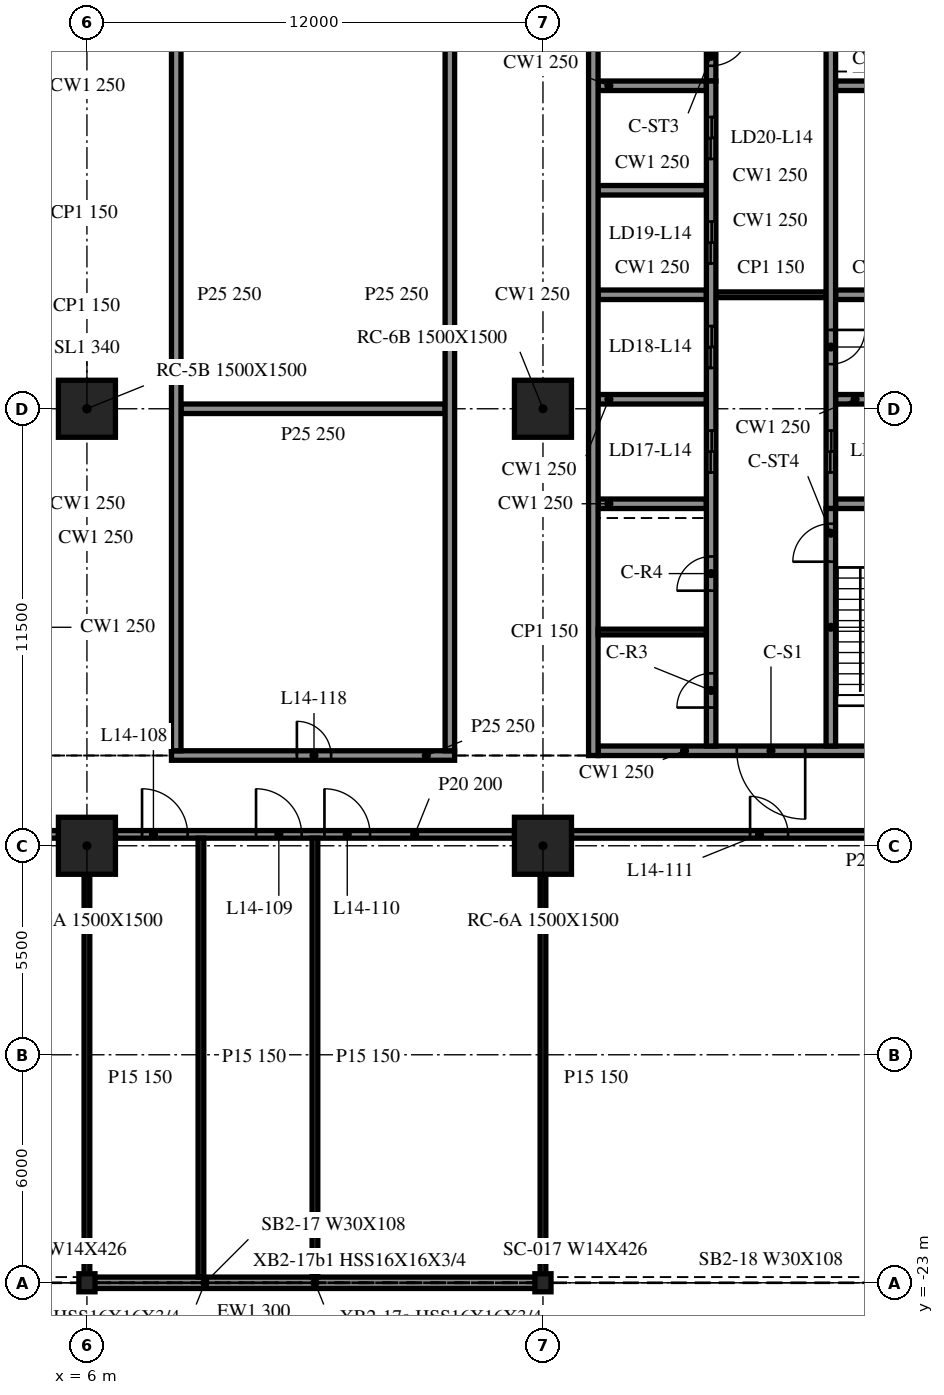
"""IFC4 building model, lengths in metres.
Left out: names, types, materials, properties, quantities, classifications, styles, units other than length and angle.
Written with IfcOpenShell. Run it as: python <this file> out.ifc"""

import sys

from ifc_helpers import new_model, si_unit, direction, frame, frame_2d, origin, origin_2d, place, context, subcontext, project, spatial, rectangle, i_section, extrude, element, fill, save


model = new_model("IFC4")
c1 = context("Model", 3, precision=1e-05, world=origin(), true_north=direction((0.0, 1.0)))
c2 = subcontext(c1, "Body", "Model", "MODEL_VIEW")
j1 = project(units=[si_unit("LENGTHUNIT", "METRE"), si_unit("PLANEANGLEUNIT", "RADIAN")], contexts=[c1])
p1 = place(None, origin())
s1 = spatial("IfcSite", under=j1, at=p1, CompositionType="ELEMENT")
p2 = place(p1, origin())
s2 = spatial("IfcBuilding", under=s1, at=p2, CompositionType="ELEMENT")
p3 = place(p2, frame((0.0, 0.0, 63.2)))
s3 = spatial("IfcBuildingStorey", under=s2, at=p3, CompositionType="ELEMENT", Elevation=63.2)
for number, where, z_axis, x_axis in (
    (1, (6.0, -11.5, -0.34), (0.0, 0.0, 1.0), (1.0, 0.0, 0.0)),
    (2, (6.0, 0.0, -0.34), (0.0, 0.0, 1.0), (1.0, 0.0, 0.0)),
    (3, (18.0, -11.5, -0.34), (0.0, 0.0, 1.0), (1.0, 0.0, 0.0)),
    (4, (18.0, 0.0, -0.34), (0.0, 0.0, 1.0), (1.0, 0.0, 0.0)),
):
    element("IfcColumn", number, at=place(p3, frame(where, z_axis=z_axis, x_axis=x_axis)), inside=s3, PredefinedType="COLUMN", context=c2, shape_type="SweptSolid", body=[
        extrude(rectangle(XDim=1.5, YDim=1.5, at=origin_2d()), origin(), (0.0, 0.0, 1.0), 4.3),
    ])
for number, where, z_axis, x_axis in (
    (5, (6.0, -23.0, -0.34), (0.0, 0.0, 1.0), (1.0, 0.0, 0.0)),
    (6, (18.0, -23.0, -0.34), (0.0, 0.0, 1.0), (1.0, 0.0, 0.0)),
):
    element("IfcColumn", number, at=place(p3, frame(where, z_axis=z_axis, x_axis=x_axis)), inside=s3, PredefinedType="COLUMN", context=c2, shape_type="SweptSolid", body=[
        extrude(i_section(OverallWidth=0.424, OverallDepth=0.475, WebThickness=0.048, FlangeThickness=0.077, at=origin_2d()), origin(), (0.0, 0.0, 1.0), 4.3),
    ])
p4 = place(p3, frame((6.024, -23.0, 0.0), z_axis=(0.0, 0.0, 1.0), x_axis=(1.0, 0.0, 0.0)))
e7 = element("IfcWall", 7, at=p4, inside=s3, PredefinedType="NOTDEFINED", context=c2, shape_type="SweptSolid", body=[
    extrude(rectangle(XDim=11.952, YDim=0.3, at=frame_2d((5.976, 0.0))), origin(), (0.0, 0.0, 1.0), 3.203),
])
p5 = place(p3, frame((19.325, 15.125, 0.0), z_axis=(0.0, 0.0, 1.0), x_axis=(0.0, -1.0, 0.0)))
e8 = element("IfcWall", 8, at=p5, inside=s3, PredefinedType="SOLIDWALL", context=c2, shape_type="SweptSolid", body=[
    extrude(rectangle(XDim=24.25, YDim=0.25, at=frame_2d((12.125, 0.0))), origin(), (0.0, 0.0, 1.0), 3.96),
])
p6 = place(p3, frame((28.55, -9.0, 0.0), z_axis=(0.0, 0.0, 1.0), x_axis=(-1.0, 0.0, 0.0)))
e9 = element("IfcWall", 9, at=p6, inside=s3, PredefinedType="SOLIDWALL", context=c2, shape_type="SweptSolid", body=[
    extrude(rectangle(XDim=9.1, YDim=0.25, at=frame_2d((4.55, 0.0))), origin(), (0.0, 0.0, 1.0), 3.96),
])
p7 = place(p6, frame((3.65, 0.0, 0.0)))
e10 = element("IfcOpeningElement", 10, at=p7, cuts=e9, PredefinedType="OPENING", context=c2, shape_type="SweptSolid", body=[
    extrude(rectangle(XDim=1.8, YDim=2.1, at=frame_2d((0.9, 1.05))), frame((0.0, 0.135, 0.0), z_axis=(0.0, -1.0, 0.0), x_axis=(1.0, 0.0, 0.0)), (0.0, 0.0, 1.0), 0.27),
])
p8 = place(p3, frame((22.425, -8.875, 0.0), z_axis=(0.0, 0.0, 1.0), x_axis=(0.0, 1.0, 0.0)))
e11 = element("IfcWall", 11, at=p8, inside=s3, PredefinedType="SOLIDWALL", context=c2, shape_type="SweptSolid", body=[
    extrude(rectangle(XDim=17.5, YDim=0.25, at=frame_2d((8.75, 0.0))), origin(), (0.0, 0.0, 1.0), 3.96),
])
p9 = place(p8, frame((7.2, 0.0, 0.0)))
e12 = element("IfcOpeningElement", 12, at=p9, cuts=e11, PredefinedType="OPENING", context=c2, shape_type="SweptSolid", body=[
    extrude(rectangle(XDim=1.1, YDim=2.1, at=frame_2d((0.55, 1.05))), frame((0.0, 0.135, 0.0), z_axis=(0.0, -1.0, 0.0), x_axis=(1.0, 0.0, 0.0)), (0.0, 0.0, 1.0), 0.27),
])
p10 = place(p8, frame((9.95, 0.0, 0.0)))
e13 = element("IfcOpeningElement", 13, at=p10, cuts=e11, PredefinedType="OPENING", context=c2, shape_type="SweptSolid", body=[
    extrude(rectangle(XDim=1.1, YDim=2.1, at=frame_2d((0.55, 1.05))), frame((0.0, 0.135, 0.0), z_axis=(0.0, -1.0, 0.0), x_axis=(1.0, 0.0, 0.0)), (0.0, 0.0, 1.0), 0.27),
])
p11 = place(p8, frame((12.7, 0.0, 0.0)))
e14 = element("IfcOpeningElement", 14, at=p11, cuts=e11, PredefinedType="OPENING", context=c2, shape_type="SweptSolid", body=[
    extrude(rectangle(XDim=1.1, YDim=2.1, at=frame_2d((0.55, 1.05))), frame((0.0, 0.135, 0.0), z_axis=(0.0, -1.0, 0.0), x_axis=(1.0, 0.0, 0.0)), (0.0, 0.0, 1.0), 0.27),
])
p12 = place(p8, frame((15.45, 0.0, 0.0)))
e15 = element("IfcOpeningElement", 15, at=p12, cuts=e11, PredefinedType="OPENING", context=c2, shape_type="SweptSolid", body=[
    extrude(rectangle(XDim=1.1, YDim=2.1, at=frame_2d((0.55, 1.05))), frame((0.0, 0.135, 0.0), z_axis=(0.0, -1.0, 0.0), x_axis=(1.0, 0.0, 0.0)), (0.0, 0.0, 1.0), 0.27),
])
p13 = place(p8, frame((1.012, 0.0, 0.0)))
e16 = element("IfcOpeningElement", 16, at=p13, cuts=e11, PredefinedType="OPENING", context=c2, shape_type="SweptSolid", body=[
    extrude(rectangle(XDim=0.9, YDim=2.1, at=frame_2d((0.45, 1.05))), frame((0.0, 0.135, 0.0), z_axis=(0.0, -1.0, 0.0), x_axis=(1.0, 0.0, 0.0)), (0.0, 0.0, 1.0), 0.27),
])
p14 = place(p8, frame((4.087, 0.0, 0.0)))
e17 = element("IfcOpeningElement", 17, at=p14, cuts=e11, PredefinedType="OPENING", context=c2, shape_type="SweptSolid", body=[
    extrude(rectangle(XDim=0.9, YDim=2.1, at=frame_2d((0.45, 1.05))), frame((0.0, 0.135, 0.0), z_axis=(0.0, -1.0, 0.0), x_axis=(1.0, 0.0, 0.0)), (0.0, 0.0, 1.0), 0.27),
])
p15 = place(p3, frame((22.425, 14.875, 0.0), z_axis=(0.0, 0.0, 1.0), x_axis=(0.0, -1.0, 0.0)))
e18 = element("IfcWall", 18, at=p15, inside=s3, PredefinedType="SOLIDWALL", context=c2, shape_type="SweptSolid", body=[
    extrude(rectangle(XDim=6.25, YDim=0.25, at=frame_2d((3.125, 0.0))), origin(), (0.0, 0.0, 1.0), 3.96),
])
p16 = place(p15, frame((4.85, 0.0, 0.0)))
e19 = element("IfcOpeningElement", 19, at=p16, cuts=e18, PredefinedType="OPENING", context=c2, shape_type="SweptSolid", body=[
    extrude(rectangle(XDim=1.0, YDim=2.1, at=frame_2d((0.5, 1.05))), frame((0.0, 0.135, 0.0), z_axis=(0.0, -1.0, 0.0), x_axis=(1.0, 0.0, 0.0)), (0.0, 0.0, 1.0), 0.27),
])
p17 = place(p3, frame((25.575, -8.875, 0.0), z_axis=(0.0, 0.0, 1.0), x_axis=(0.0, 1.0, 0.0)))
e20 = element("IfcWall", 20, at=p17, inside=s3, PredefinedType="SOLIDWALL", context=c2, shape_type="SweptSolid", body=[
    extrude(rectangle(XDim=6.25, YDim=0.25, at=frame_2d((3.125, 0.0))), origin(), (0.0, 0.0, 1.0), 3.96),
])
p18 = place(p17, frame((4.85, 0.0, 0.0)))
e21 = element("IfcOpeningElement", 21, at=p18, cuts=e20, PredefinedType="OPENING", context=c2, shape_type="SweptSolid", body=[
    extrude(rectangle(XDim=1.0, YDim=2.1, at=frame_2d((0.5, 1.05))), frame((0.0, 0.135, 0.0), z_axis=(0.0, -1.0, 0.0), x_axis=(1.0, 0.0, 0.0)), (0.0, 0.0, 1.0), 0.27),
])
p19 = place(p3, frame((25.575, 14.875, 0.0), z_axis=(0.0, 0.0, 1.0), x_axis=(0.0, -1.0, 0.0)))
e22 = element("IfcWall", 22, at=p19, inside=s3, PredefinedType="SOLIDWALL", context=c2, shape_type="SweptSolid", body=[
    extrude(rectangle(XDim=17.5, YDim=0.25, at=frame_2d((8.75, 0.0))), origin(), (0.0, 0.0, 1.0), 3.96),
])
p20 = place(p19, frame((15.45, 0.0, 0.0)))
e23 = element("IfcOpeningElement", 23, at=p20, cuts=e22, PredefinedType="OPENING", context=c2, shape_type="SweptSolid", body=[
    extrude(rectangle(XDim=1.1, YDim=2.1, at=frame_2d((0.55, 1.05))), frame((0.0, 0.135, 0.0), z_axis=(0.0, -1.0, 0.0), x_axis=(1.0, 0.0, 0.0)), (0.0, 0.0, 1.0), 0.27),
])
p21 = place(p19, frame((12.8, 0.0, 0.0)))
e24 = element("IfcOpeningElement", 24, at=p21, cuts=e22, PredefinedType="OPENING", context=c2, shape_type="SweptSolid", body=[
    extrude(rectangle(XDim=0.9, YDim=2.1, at=frame_2d((0.45, 1.05))), frame((0.0, 0.135, 0.0), z_axis=(0.0, -1.0, 0.0), x_axis=(1.0, 0.0, 0.0)), (0.0, 0.0, 1.0), 0.27),
])
for number, where, z_axis, x_axis in (
    (25, (19.45, -2.5, 0.0), (0.0, 0.0, 1.0), (1.0, 0.0, 0.0)),
    (26, (19.45, 0.25, 0.0), (0.0, 0.0, 1.0), (1.0, 0.0, 0.0)),
    (27, (19.45, 3.0, 0.0), (0.0, 0.0, 1.0), (1.0, 0.0, 0.0)),
    (28, (19.45, 5.75, 0.0), (0.0, 0.0, 1.0), (1.0, 0.0, 0.0)),
    (29, (19.45, 8.5, 0.0), (0.0, 0.0, 1.0), (1.0, 0.0, 0.0)),
    (30, (25.7, -2.5, 0.0), (0.0, 0.0, 1.0), (1.0, 0.0, 0.0)),
    (31, (25.7, 0.25, 0.0), (0.0, 0.0, 1.0), (1.0, 0.0, 0.0)),
    (32, (25.7, 3.0, 0.0), (0.0, 0.0, 1.0), (1.0, 0.0, 0.0)),
    (33, (25.7, 8.5, 0.0), (0.0, 0.0, 1.0), (1.0, 0.0, 0.0)),
):
    element("IfcWall", number, at=place(p3, frame(where, z_axis=z_axis, x_axis=x_axis)), inside=s3, PredefinedType="SOLIDWALL", context=c2, shape_type="SweptSolid", body=[
        extrude(rectangle(XDim=2.85, YDim=0.25, at=frame_2d((1.425, 0.0))), origin(), (0.0, 0.0, 1.0), 3.96),
    ])
p22 = place(p3, frame((22.55, 3.0, 0.0), z_axis=(0.0, 0.0, 1.0), x_axis=(1.0, 0.0, 0.0)))
e34 = element("IfcWall", 34, at=p22, inside=s3, PredefinedType="PARTITIONING", context=c2, shape_type="SweptSolid", body=[
    extrude(rectangle(XDim=2.9, YDim=0.15, at=frame_2d((1.45, 0.0))), origin(), (0.0, 0.0, 1.0), 3.96),
])
p23 = place(p3, frame((19.45, -5.875, 0.0), z_axis=(0.0, 0.0, 1.0), x_axis=(1.0, 0.0, 0.0)))
e35 = element("IfcWall", 35, at=p23, inside=s3, PredefinedType="PARTITIONING", context=c2, shape_type="SweptSolid", body=[
    extrude(rectangle(XDim=2.85, YDim=0.15, at=frame_2d((1.425, 0.0))), origin(), (0.0, 0.0, 1.0), 3.96),
])
p24 = place(p3, frame((-5.25, -11.2, 0.0), z_axis=(0.0, 0.0, 1.0), x_axis=(1.0, 0.0, 0.0)))
e36 = element("IfcWall", 36, at=p24, inside=s3, PredefinedType="PARTITIONING", context=c2, shape_type="SweptSolid", body=[
    extrude(rectangle(XDim=10.5, YDim=0.2, at=frame_2d((5.25, 0.0))), origin(), (0.0, 0.0, 1.0), 3.96),
])
p25 = place(p24, frame((4.7, 0.0, 0.0)))
e37 = element("IfcOpeningElement", 37, at=p25, cuts=e36, PredefinedType="OPENING", context=c2, shape_type="SweptSolid", body=[
    extrude(rectangle(XDim=1.2, YDim=2.1, at=frame_2d((0.6, 1.05))), frame((0.0, 0.11, 0.0), z_axis=(0.0, -1.0, 0.0), x_axis=(1.0, 0.0, 0.0)), (0.0, 0.0, 1.0), 0.22),
])
p26 = place(p3, frame((6.75, -11.2, 0.0), z_axis=(0.0, 0.0, 1.0), x_axis=(1.0, 0.0, 0.0)))
e38 = element("IfcWall", 38, at=p26, inside=s3, PredefinedType="PARTITIONING", context=c2, shape_type="SweptSolid", body=[
    extrude(rectangle(XDim=10.5, YDim=0.2, at=frame_2d((5.25, 0.0))), origin(), (0.0, 0.0, 1.0), 3.96),
])
p27 = place(p26, frame((0.7, 0.0, 0.0)))
e39 = element("IfcOpeningElement", 39, at=p27, cuts=e38, PredefinedType="OPENING", context=c2, shape_type="SweptSolid", body=[
    extrude(rectangle(XDim=1.2, YDim=2.1, at=frame_2d((0.6, 1.05))), frame((0.0, 0.11, 0.0), z_axis=(0.0, -1.0, 0.0), x_axis=(1.0, 0.0, 0.0)), (0.0, 0.0, 1.0), 0.22),
])
p28 = place(p26, frame((3.7, 0.0, 0.0)))
e40 = element("IfcOpeningElement", 40, at=p28, cuts=e38, PredefinedType="OPENING", context=c2, shape_type="SweptSolid", body=[
    extrude(rectangle(XDim=1.2, YDim=2.1, at=frame_2d((0.6, 1.05))), frame((0.0, 0.11, 0.0), z_axis=(0.0, -1.0, 0.0), x_axis=(1.0, 0.0, 0.0)), (0.0, 0.0, 1.0), 0.22),
])
p29 = place(p26, frame((5.5, 0.0, 0.0)))
e41 = element("IfcOpeningElement", 41, at=p29, cuts=e38, PredefinedType="OPENING", context=c2, shape_type="SweptSolid", body=[
    extrude(rectangle(XDim=1.2, YDim=2.1, at=frame_2d((0.6, 1.05))), frame((0.0, 0.11, 0.0), z_axis=(0.0, -1.0, 0.0), x_axis=(1.0, 0.0, 0.0)), (0.0, 0.0, 1.0), 0.22),
])
p30 = place(p3, frame((18.75, -11.2, 0.0), z_axis=(0.0, 0.0, 1.0), x_axis=(1.0, 0.0, 0.0)))
e42 = element("IfcWall", 42, at=p30, inside=s3, PredefinedType="PARTITIONING", context=c2, shape_type="SweptSolid", body=[
    extrude(rectangle(XDim=10.5, YDim=0.2, at=frame_2d((5.25, 0.0))), origin(), (0.0, 0.0, 1.0), 3.96),
])
p31 = place(p30, frame((4.7, 0.0, 0.0)))
e43 = element("IfcOpeningElement", 43, at=p31, cuts=e42, PredefinedType="OPENING", context=c2, shape_type="SweptSolid", body=[
    extrude(rectangle(XDim=1.0, YDim=2.1, at=frame_2d((0.5, 1.05))), frame((0.0, 0.11, 0.0), z_axis=(0.0, -1.0, 0.0), x_axis=(1.0, 0.0, 0.0)), (0.0, 0.0, 1.0), 0.22),
])
p32 = place(p3, frame((8.225, -9.125, 0.0), z_axis=(0.0, 0.0, 1.0), x_axis=(1.0, 0.0, 0.0)))
e44 = element("IfcWall", 44, at=p32, inside=s3, PredefinedType="PARTITIONING", context=c2, shape_type="SweptSolid", body=[
    extrude(rectangle(XDim=7.45, YDim=0.25, at=frame_2d((3.725, 0.0))), origin(), (0.0, 0.0, 1.0), 3.96),
])
p33 = place(p32, frame((3.3, 0.0, 0.0)))
e45 = element("IfcOpeningElement", 45, at=p33, cuts=e44, PredefinedType="OPENING", context=c2, shape_type="SweptSolid", body=[
    extrude(rectangle(XDim=0.9, YDim=2.1, at=frame_2d((0.45, 1.05))), frame((0.0, 0.135, 0.0), z_axis=(0.0, -1.0, 0.0), x_axis=(1.0, 0.0, 0.0)), (0.0, 0.0, 1.0), 0.27),
])
p34 = place(p3, frame((8.475, 0.0, 0.0), z_axis=(0.0, 0.0, 1.0), x_axis=(1.0, 0.0, 0.0)))
e46 = element("IfcWall", 46, at=p34, inside=s3, PredefinedType="PARTITIONING", context=c2, shape_type="SweptSolid", body=[
    extrude(rectangle(XDim=6.95, YDim=0.25, at=frame_2d((3.475, 0.0))), origin(), (0.0, 0.0, 1.0), 3.96),
])
p35 = place(p3, frame((6.0, -22.975, 0.0), z_axis=(0.0, 0.0, 1.0), x_axis=(0.0, 1.0, 0.0)))
e47 = element("IfcWall", 47, at=p35, inside=s3, PredefinedType="PARTITIONING", context=c2, shape_type="SweptSolid", body=[
    extrude(rectangle(XDim=10.725, YDim=0.15, at=frame_2d((5.363, 0.0))), origin(), (0.0, 0.0, 1.0), 3.96),
])
p36 = place(p3, frame((8.35, -9.0, 0.0), z_axis=(0.0, 0.0, 1.0), x_axis=(0.0, 1.0, 0.0)))
e48 = element("IfcWall", 48, at=p36, inside=s3, PredefinedType="PARTITIONING", context=c2, shape_type="SweptSolid", body=[
    extrude(rectangle(XDim=24.0, YDim=0.25, at=frame_2d((12.0, 0.0))), origin(), (0.0, 0.0, 1.0), 3.96),
])
for number, where, z_axis, x_axis in (
    (49, (9.0, -22.85, 0.0), (0.0, 0.0, 1.0), (0.0, 1.0, 0.0)),
    (50, (12.0, -22.85, 0.0), (0.0, 0.0, 1.0), (0.0, 1.0, 0.0)),
):
    element("IfcWall", number, at=place(p3, frame(where, z_axis=z_axis, x_axis=x_axis)), inside=s3, PredefinedType="PARTITIONING", context=c2, shape_type="SweptSolid", body=[
        extrude(rectangle(XDim=11.55, YDim=0.15, at=frame_2d((5.775, 0.0))), origin(), (0.0, 0.0, 1.0), 3.96),
    ])
p37 = place(p3, frame((15.55, -9.0, 0.0), z_axis=(0.0, 0.0, 1.0), x_axis=(0.0, 1.0, 0.0)))
e51 = element("IfcWall", 51, at=p37, inside=s3, PredefinedType="PARTITIONING", context=c2, shape_type="SweptSolid", body=[
    extrude(rectangle(XDim=24.0, YDim=0.25, at=frame_2d((12.0, 0.0))), origin(), (0.0, 0.0, 1.0), 3.96),
])
p38 = place(p3, frame((18.0, -22.975, 0.0), z_axis=(0.0, 0.0, 1.0), x_axis=(0.0, 1.0, 0.0)))
e52 = element("IfcWall", 52, at=p38, inside=s3, PredefinedType="PARTITIONING", context=c2, shape_type="SweptSolid", body=[
    extrude(rectangle(XDim=10.725, YDim=0.15, at=frame_2d((5.363, 0.0))), origin(), (0.0, 0.0, 1.0), 3.96),
])
p39 = place(p7, origin())
e53 = element("IfcDoor", 53, at=p39, inside=s3, OperationType="DOUBLE_DOOR_SINGLE_SWING", PredefinedType="DOOR", context=c2, shape_type="SweptSolid", body=[
    extrude(rectangle(XDim=1.8, YDim=2.1, at=frame_2d((0.9, 1.05))), frame((0.0, 0.025, 0.0), z_axis=(0.0, -1.0, 0.0), x_axis=(1.0, 0.0, 0.0)), (0.0, 0.0, 1.0), 0.05),
])
fill(e10, e53)
p40 = place(p20, origin())
e54 = element("IfcDoor", 54, at=p40, inside=s3, OperationType="DOUBLE_DOOR_SLIDING", PredefinedType="DOOR", context=c2, shape_type="SweptSolid", body=[
    extrude(rectangle(XDim=1.1, YDim=2.1, at=frame_2d((0.55, 1.05))), frame((0.0, 0.025, 0.0), z_axis=(0.0, -1.0, 0.0), x_axis=(1.0, 0.0, 0.0)), (0.0, 0.0, 1.0), 0.05),
])
fill(e23, e54)
p41 = place(p9, origin())
e55 = element("IfcDoor", 55, at=p41, inside=s3, OperationType="DOUBLE_DOOR_SLIDING", PredefinedType="DOOR", context=c2, shape_type="SweptSolid", body=[
    extrude(rectangle(XDim=1.1, YDim=2.1, at=frame_2d((0.55, 1.05))), frame((0.0, 0.025, 0.0), z_axis=(0.0, -1.0, 0.0), x_axis=(1.0, 0.0, 0.0)), (0.0, 0.0, 1.0), 0.05),
])
fill(e12, e55)
p42 = place(p10, origin())
e56 = element("IfcDoor", 56, at=p42, inside=s3, OperationType="DOUBLE_DOOR_SLIDING", PredefinedType="DOOR", context=c2, shape_type="SweptSolid", body=[
    extrude(rectangle(XDim=1.1, YDim=2.1, at=frame_2d((0.55, 1.05))), frame((0.0, 0.025, 0.0), z_axis=(0.0, -1.0, 0.0), x_axis=(1.0, 0.0, 0.0)), (0.0, 0.0, 1.0), 0.05),
])
fill(e13, e56)
p43 = place(p11, origin())
e57 = element("IfcDoor", 57, at=p43, inside=s3, OperationType="DOUBLE_DOOR_SLIDING", PredefinedType="DOOR", context=c2, shape_type="SweptSolid", body=[
    extrude(rectangle(XDim=1.1, YDim=2.1, at=frame_2d((0.55, 1.05))), frame((0.0, 0.025, 0.0), z_axis=(0.0, -1.0, 0.0), x_axis=(1.0, 0.0, 0.0)), (0.0, 0.0, 1.0), 0.05),
])
fill(e14, e57)
p44 = place(p12, origin())
e58 = element("IfcDoor", 58, at=p44, inside=s3, OperationType="DOUBLE_DOOR_SLIDING", PredefinedType="DOOR", context=c2, shape_type="SweptSolid", body=[
    extrude(rectangle(XDim=1.1, YDim=2.1, at=frame_2d((0.55, 1.05))), frame((0.0, 0.025, 0.0), z_axis=(0.0, -1.0, 0.0), x_axis=(1.0, 0.0, 0.0)), (0.0, 0.0, 1.0), 0.05),
])
fill(e15, e58)
p45 = place(p21, origin())
e59 = element("IfcDoor", 59, at=p45, inside=s3, OperationType="SINGLE_SWING_LEFT", PredefinedType="DOOR", context=c2, shape_type="SweptSolid", body=[
    extrude(rectangle(XDim=0.9, YDim=2.1, at=frame_2d((0.45, 1.05))), frame((0.0, 0.025, 0.0), z_axis=(0.0, -1.0, 0.0), x_axis=(1.0, 0.0, 0.0)), (0.0, 0.0, 1.0), 0.05),
])
fill(e24, e59)
p46 = place(p13, origin())
e60 = element("IfcDoor", 60, at=p46, inside=s3, OperationType="SINGLE_SWING_LEFT", PredefinedType="DOOR", context=c2, shape_type="SweptSolid", body=[
    extrude(rectangle(XDim=0.9, YDim=2.1, at=frame_2d((0.45, 1.05))), frame((0.0, 0.025, 0.0), z_axis=(0.0, -1.0, 0.0), x_axis=(1.0, 0.0, 0.0)), (0.0, 0.0, 1.0), 0.05),
])
fill(e16, e60)
p47 = place(p14, origin())
e61 = element("IfcDoor", 61, at=p47, inside=s3, OperationType="SINGLE_SWING_RIGHT", PredefinedType="DOOR", context=c2, shape_type="SweptSolid", body=[
    extrude(rectangle(XDim=0.9, YDim=2.1, at=frame_2d((0.45, 1.05))), frame((0.0, 0.025, 0.0), z_axis=(0.0, -1.0, 0.0), x_axis=(1.0, 0.0, 0.0)), (0.0, 0.0, 1.0), 0.05),
])
fill(e17, e61)
p48 = place(p16, origin())
e62 = element("IfcDoor", 62, at=p48, inside=s3, OperationType="SINGLE_SWING_RIGHT", PredefinedType="DOOR", context=c2, shape_type="SweptSolid", body=[
    extrude(rectangle(XDim=1.0, YDim=2.1, at=frame_2d((0.5, 1.05))), frame((0.0, 0.025, 0.0), z_axis=(0.0, -1.0, 0.0), x_axis=(1.0, 0.0, 0.0)), (0.0, 0.0, 1.0), 0.05),
])
fill(e19, e62)
p49 = place(p18, origin())
e63 = element("IfcDoor", 63, at=p49, inside=s3, OperationType="SINGLE_SWING_LEFT", PredefinedType="DOOR", context=c2, shape_type="SweptSolid", body=[
    extrude(rectangle(XDim=1.0, YDim=2.1, at=frame_2d((0.5, 1.05))), frame((0.0, 0.025, 0.0), z_axis=(0.0, -1.0, 0.0), x_axis=(1.0, 0.0, 0.0)), (0.0, 0.0, 1.0), 0.05),
])
fill(e21, e63)
p50 = place(p27, origin())
e64 = element("IfcDoor", 64, at=p50, inside=s3, OperationType="SINGLE_SWING_RIGHT", PredefinedType="DOOR", context=c2, shape_type="SweptSolid", body=[
    extrude(rectangle(XDim=1.2, YDim=2.1, at=frame_2d((0.6, 1.05))), frame((0.0, 0.025, 0.0), z_axis=(0.0, -1.0, 0.0), x_axis=(1.0, 0.0, 0.0)), (0.0, 0.0, 1.0), 0.05),
])
fill(e39, e64)
p51 = place(p28, origin())
e65 = element("IfcDoor", 65, at=p51, inside=s3, OperationType="SINGLE_SWING_RIGHT", PredefinedType="DOOR", context=c2, shape_type="SweptSolid", body=[
    extrude(rectangle(XDim=1.2, YDim=2.1, at=frame_2d((0.6, 1.05))), frame((0.0, 0.025, 0.0), z_axis=(0.0, -1.0, 0.0), x_axis=(1.0, 0.0, 0.0)), (0.0, 0.0, 1.0), 0.05),
])
fill(e40, e65)
p52 = place(p29, origin())
e66 = element("IfcDoor", 66, at=p52, inside=s3, OperationType="SINGLE_SWING_LEFT", PredefinedType="DOOR", context=c2, shape_type="SweptSolid", body=[
    extrude(rectangle(XDim=1.2, YDim=2.1, at=frame_2d((0.6, 1.05))), frame((0.0, 0.025, 0.0), z_axis=(0.0, -1.0, 0.0), x_axis=(1.0, 0.0, 0.0)), (0.0, 0.0, 1.0), 0.05),
])
fill(e41, e66)
p53 = place(p31, origin())
e67 = element("IfcDoor", 67, at=p53, inside=s3, OperationType="SINGLE_SWING_RIGHT", PredefinedType="DOOR", context=c2, shape_type="SweptSolid", body=[
    extrude(rectangle(XDim=1.0, YDim=2.1, at=frame_2d((0.5, 1.05))), frame((0.0, 0.025, 0.0), z_axis=(0.0, -1.0, 0.0), x_axis=(1.0, 0.0, 0.0)), (0.0, 0.0, 1.0), 0.05),
])
fill(e43, e67)
p54 = place(p33, origin())
e68 = element("IfcDoor", 68, at=p54, inside=s3, OperationType="SINGLE_SWING_RIGHT", PredefinedType="DOOR", context=c2, shape_type="SweptSolid", body=[
    extrude(rectangle(XDim=0.9, YDim=2.1, at=frame_2d((0.45, 1.05))), frame((0.0, 0.025, 0.0), z_axis=(0.0, -1.0, 0.0), x_axis=(1.0, 0.0, 0.0)), (0.0, 0.0, 1.0), 0.05),
])
fill(e45, e68)
save(model, sys.argv[1])
